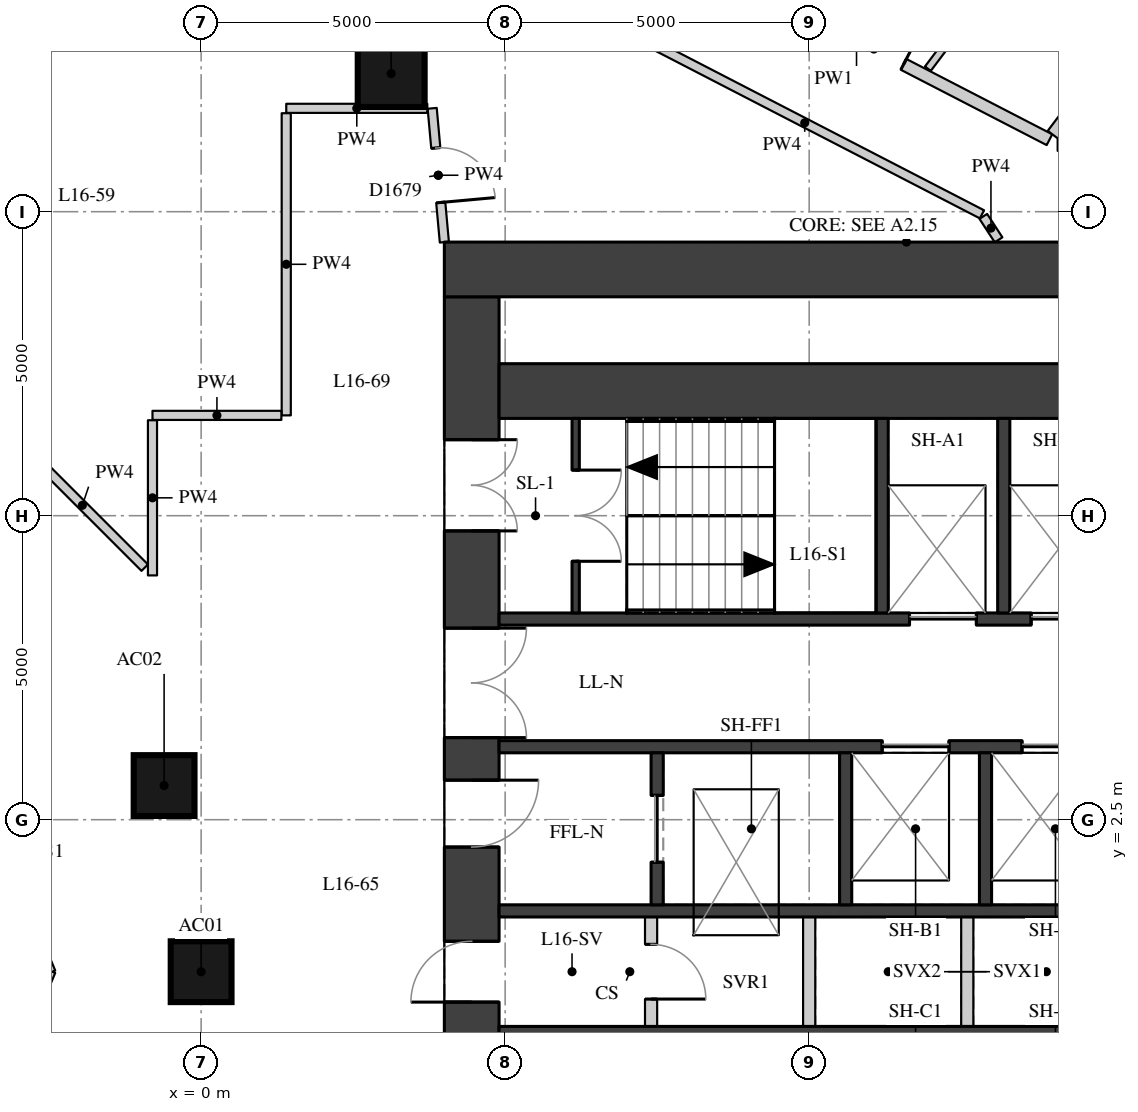
"""IFC4 building model, lengths in metres.
Left out: names, types, materials, properties, quantities, classifications, styles, units other than length and angle.
Written with IfcOpenShell. Run it as: python <this file> out.ifc"""

import sys

from ifc_helpers import new_model, si_unit, direction, frame, frame_2d, origin, origin_2d, place, context, subcontext, project, spatial, rectangle, extrude, element, fill, save


model = new_model("IFC4")
c1 = context("Model", 3, precision=1e-05, world=origin(), true_north=direction((0.0, 1.0)))
c2 = subcontext(c1, "Body", "Model", "MODEL_VIEW")
j1 = project(units=[si_unit("LENGTHUNIT", "METRE"), si_unit("PLANEANGLEUNIT", "RADIAN")], contexts=[c1])
p1 = place(None, origin())
s1 = spatial("IfcSite", under=j1, at=p1, CompositionType="ELEMENT")
p2 = place(p1, origin())
s2 = spatial("IfcBuilding", under=s1, at=p2, CompositionType="ELEMENT")
p3 = place(p2, frame((0.0, 0.0, 61.3)))
s3 = spatial("IfcBuildingStorey", under=s2, at=p3, CompositionType="ELEMENT", Elevation=61.3)
for number, where, z_axis, x_axis in (
    (1, (0.0, 0.0, 0.0), (0.0, 0.0, 1.0), (1.0, 0.0, 0.0)),
    (2, (-0.609, 3.062, 0.0), (0.0, 0.0, 1.0), (1.0, 0.0, 0.0)),
):
    element("IfcColumn", number, at=place(p3, frame(where, z_axis=z_axis, x_axis=x_axis)), inside=s3, PredefinedType="COLUMN", context=c2, shape_type="SweptSolid", body=[
        extrude(rectangle(XDim=1.0, YDim=1.0, at=origin_2d()), origin(), (0.0, 0.0, 1.0), 3.3),
    ])
p4 = place(p3, frame((3.126, 14.772, 0.0), z_axis=(0.0, 0.0, 1.0), x_axis=(1.0, 0.0, 0.0)))
e3 = element("IfcColumn", 3, at=p4, inside=s3, PredefinedType="COLUMN", context=c2, shape_type="SweptSolid", body=[
    extrude(rectangle(XDim=1.1, YDim=1.1, at=origin_2d()), origin(), (0.0, 0.0, 1.0), 3.3),
])
p5 = place(p3, frame((4.45, -11.1, 0.0), z_axis=(0.0, 0.0, 1.0), x_axis=(0.0, 1.0, 0.0)))
e4 = element("IfcWall", 4, at=p5, inside=s3, PredefinedType="SHEAR", context=c2, shape_type="SweptSolid", body=[
    extrude(rectangle(XDim=22.2, YDim=0.9, at=frame_2d((11.1, 0.0))), origin(), (0.0, 0.0, 1.0), 3.02),
])
p6 = place(p5, frame((2.35, 0.0, 0.0)))
e5 = element("IfcOpeningElement", 5, at=p6, cuts=e4, PredefinedType="OPENING", context=c2, shape_type="SweptSolid", body=[
    extrude(rectangle(XDim=1.5, YDim=2.1, at=frame_2d((0.75, 1.05))), frame((0.0, 0.46, 0.0), z_axis=(0.0, -1.0, 0.0), x_axis=(1.0, 0.0, 0.0)), (0.0, 0.0, 1.0), 0.92),
])
p7 = place(p5, frame((5.45, 0.0, 0.0)))
e6 = element("IfcOpeningElement", 6, at=p7, cuts=e4, PredefinedType="OPENING", context=c2, shape_type="SweptSolid", body=[
    extrude(rectangle(XDim=1.8, YDim=2.1, at=frame_2d((0.9, 1.05))), frame((0.0, 0.46, 0.0), z_axis=(0.0, -1.0, 0.0), x_axis=(1.0, 0.0, 0.0)), (0.0, 0.0, 1.0), 0.92),
])
p8 = place(p5, frame((7.95, 0.0, 0.0)))
e7 = element("IfcOpeningElement", 7, at=p8, cuts=e4, PredefinedType="OPENING", context=c2, shape_type="SweptSolid", body=[
    extrude(rectangle(XDim=1.1, YDim=2.1, at=frame_2d((0.55, 1.05))), frame((0.0, 0.46, 0.0), z_axis=(0.0, -1.0, 0.0), x_axis=(1.0, 0.0, 0.0)), (0.0, 0.0, 1.0), 0.92),
])
p9 = place(p5, frame((10.6, 0.0, 0.0)))
e8 = element("IfcOpeningElement", 8, at=p9, cuts=e4, PredefinedType="OPENING", context=c2, shape_type="SweptSolid", body=[
    extrude(rectangle(XDim=1.0, YDim=2.1, at=frame_2d((0.5, 1.05))), frame((0.0, 0.46, 0.0), z_axis=(0.0, -1.0, 0.0), x_axis=(1.0, 0.0, 0.0)), (0.0, 0.0, 1.0), 0.92),
])
p10 = place(p5, frame((13.15, 0.0, 0.0)))
e9 = element("IfcOpeningElement", 9, at=p10, cuts=e4, PredefinedType="OPENING", context=c2, shape_type="SweptSolid", body=[
    extrude(rectangle(XDim=1.1, YDim=2.1, at=frame_2d((0.55, 1.05))), frame((0.0, 0.46, 0.0), z_axis=(0.0, -1.0, 0.0), x_axis=(1.0, 0.0, 0.0)), (0.0, 0.0, 1.0), 0.92),
])
p11 = place(p5, frame((14.95, 0.0, 0.0)))
e10 = element("IfcOpeningElement", 10, at=p11, cuts=e4, PredefinedType="OPENING", context=c2, shape_type="SweptSolid", body=[
    extrude(rectangle(XDim=1.8, YDim=2.1, at=frame_2d((0.9, 1.05))), frame((0.0, 0.46, 0.0), z_axis=(0.0, -1.0, 0.0), x_axis=(1.0, 0.0, 0.0)), (0.0, 0.0, 1.0), 0.92),
])
p12 = place(p5, frame((18.35, 0.0, 0.0)))
e11 = element("IfcOpeningElement", 11, at=p12, cuts=e4, PredefinedType="OPENING", context=c2, shape_type="SweptSolid", body=[
    extrude(rectangle(XDim=1.5, YDim=2.1, at=frame_2d((0.75, 1.05))), frame((0.0, 0.46, 0.0), z_axis=(0.0, -1.0, 0.0), x_axis=(1.0, 0.0, 0.0)), (0.0, 0.0, 1.0), 0.92),
])
p13 = place(p3, frame((4.0, 11.55, 0.0), z_axis=(0.0, 0.0, 1.0), x_axis=(1.0, 0.0, 0.0)))
e12 = element("IfcWall", 12, at=p13, inside=s3, PredefinedType="SHEAR", context=c2, shape_type="SweptSolid", body=[
    extrude(rectangle(XDim=15.2, YDim=0.9, at=frame_2d((7.6, 0.0))), origin(), (0.0, 0.0, 1.0), 3.02),
])
p14 = place(p3, frame((4.9, 9.55, 0.0), z_axis=(0.0, 0.0, 1.0), x_axis=(1.0, 0.0, 0.0)))
e13 = element("IfcWall", 13, at=p14, inside=s3, PredefinedType="SHEAR", context=c2, shape_type="SweptSolid", body=[
    extrude(rectangle(XDim=10.2, YDim=0.9, at=frame_2d((5.1, 0.0))), origin(), (0.0, 0.0, 1.0), 3.02),
])
p15 = place(p3, frame((4.9, 5.8, 0.0), z_axis=(0.0, 0.0, 1.0), x_axis=(1.0, 0.0, 0.0)))
e14 = element("IfcWall", 14, at=p15, inside=s3, PredefinedType="SHEAR", context=c2, shape_type="SweptSolid", body=[
    extrude(rectangle(XDim=10.2, YDim=0.2, at=frame_2d((5.1, 0.0))), origin(), (0.0, 0.0, 1.0), 3.02),
])
p16 = place(p15, frame((6.75, 0.0, 0.0)))
e15 = element("IfcOpeningElement", 15, at=p16, cuts=e14, PredefinedType="OPENING", context=c2, shape_type="SweptSolid", body=[
    extrude(rectangle(XDim=1.1, YDim=2.1, at=frame_2d((0.55, 1.05))), frame((0.0, 0.11, 0.0), z_axis=(0.0, -1.0, 0.0), x_axis=(1.0, 0.0, 0.0)), (0.0, 0.0, 1.0), 0.22),
])
p17 = place(p15, frame((8.75, 0.0, 0.0)))
e16 = element("IfcOpeningElement", 16, at=p17, cuts=e14, PredefinedType="OPENING", context=c2, shape_type="SweptSolid", body=[
    extrude(rectangle(XDim=1.1, YDim=2.1, at=frame_2d((0.55, 1.05))), frame((0.0, 0.11, 0.0), z_axis=(0.0, -1.0, 0.0), x_axis=(1.0, 0.0, 0.0)), (0.0, 0.0, 1.0), 0.22),
])
p18 = place(p3, frame((4.9, 3.7, 0.0), z_axis=(0.0, 0.0, 1.0), x_axis=(1.0, 0.0, 0.0)))
e17 = element("IfcWall", 17, at=p18, inside=s3, PredefinedType="SHEAR", context=c2, shape_type="SweptSolid", body=[
    extrude(rectangle(XDim=10.2, YDim=0.2, at=frame_2d((5.1, 0.0))), origin(), (0.0, 0.0, 1.0), 3.02),
])
p19 = place(p18, frame((6.3, 0.0, 0.0)))
e18 = element("IfcOpeningElement", 18, at=p19, cuts=e17, PredefinedType="OPENING", context=c2, shape_type="SweptSolid", body=[
    extrude(rectangle(XDim=1.1, YDim=2.1, at=frame_2d((0.55, 1.05))), frame((0.0, 0.11, 0.0), z_axis=(0.0, -1.0, 0.0), x_axis=(1.0, 0.0, 0.0)), (0.0, 0.0, 1.0), 0.22),
])
p20 = place(p18, frame((8.6, 0.0, 0.0)))
e19 = element("IfcOpeningElement", 19, at=p20, cuts=e17, PredefinedType="OPENING", context=c2, shape_type="SweptSolid", body=[
    extrude(rectangle(XDim=1.1, YDim=2.1, at=frame_2d((0.55, 1.05))), frame((0.0, 0.11, 0.0), z_axis=(0.0, -1.0, 0.0), x_axis=(1.0, 0.0, 0.0)), (0.0, 0.0, 1.0), 0.22),
])
for number, where, z_axis, x_axis in (
    (20, (4.9, 1.0, 0.0), (0.0, 0.0, 1.0), (1.0, 0.0, 0.0)),
    (21, (4.9, -1.0, 0.0), (0.0, 0.0, 1.0), (1.0, 0.0, 0.0)),
):
    element("IfcWall", number, at=place(p3, frame(where, z_axis=z_axis, x_axis=x_axis)), inside=s3, PredefinedType="SHEAR", context=c2, shape_type="SweptSolid", body=[
        extrude(rectangle(XDim=10.2, YDim=0.2, at=frame_2d((5.1, 0.0))), origin(), (0.0, 0.0, 1.0), 3.02),
    ])
for number, where, z_axis, x_axis in (
    (22, (11.2, 5.9, 0.0), (0.0, 0.0, 1.0), (0.0, 1.0, 0.0)),
    (23, (13.2, 5.9, 0.0), (0.0, 0.0, 1.0), (0.0, 1.0, 0.0)),
):
    element("IfcWall", number, at=place(p3, frame(where, z_axis=z_axis, x_axis=x_axis)), inside=s3, PredefinedType="SHEAR", context=c2, shape_type="SweptSolid", body=[
        extrude(rectangle(XDim=3.2, YDim=0.2, at=frame_2d((1.6, 0.0))), origin(), (0.0, 0.0, 1.0), 3.02),
    ])
p21 = place(p3, frame((7.5, 1.1, 0.0), z_axis=(0.0, 0.0, 1.0), x_axis=(0.0, 1.0, 0.0)))
e24 = element("IfcWall", 24, at=p21, inside=s3, PredefinedType="SHEAR", context=c2, shape_type="SweptSolid", body=[
    extrude(rectangle(XDim=2.5, YDim=0.2, at=frame_2d((1.25, 0.0))), origin(), (0.0, 0.0, 1.0), 3.02),
])
p22 = place(p21, frame((0.7, 0.0, 0.0)))
e25 = element("IfcOpeningElement", 25, at=p22, cuts=e24, PredefinedType="OPENING", context=c2, shape_type="SweptSolid", body=[
    extrude(rectangle(XDim=1.1, YDim=2.1, at=frame_2d((0.55, 1.05))), frame((0.0, 0.11, 0.0), z_axis=(0.0, -1.0, 0.0), x_axis=(1.0, 0.0, 0.0)), (0.0, 0.0, 1.0), 0.22),
])
for number, where, z_axis, x_axis in (
    (26, (10.6, 1.1, 0.0), (0.0, 0.0, 1.0), (0.0, 1.0, 0.0)),
    (27, (12.9, 1.1, 0.0), (0.0, 0.0, 1.0), (0.0, 1.0, 0.0)),
):
    element("IfcWall", number, at=place(p3, frame(where, z_axis=z_axis, x_axis=x_axis)), inside=s3, PredefinedType="SHEAR", context=c2, shape_type="SweptSolid", body=[
        extrude(rectangle(XDim=2.5, YDim=0.2, at=frame_2d((1.25, 0.0))), origin(), (0.0, 0.0, 1.0), 3.02),
    ])
p23 = place(p3, frame((6.16, 5.9, 0.0), z_axis=(0.0, 0.0, 1.0), x_axis=(0.0, 1.0, 0.0)))
e28 = element("IfcWall", 28, at=p23, inside=s3, PredefinedType="SHEAR", context=c2, shape_type="SweptSolid", body=[
    extrude(rectangle(XDim=3.2, YDim=0.12, at=frame_2d((1.6, 0.0))), origin(), (0.0, 0.0, 1.0), 3.02),
])
p24 = place(p23, frame((0.85, 0.0, 0.0)))
e29 = element("IfcOpeningElement", 29, at=p24, cuts=e28, PredefinedType="OPENING", context=c2, shape_type="SweptSolid", body=[
    extrude(rectangle(XDim=1.5, YDim=2.1, at=frame_2d((0.75, 1.05))), frame((0.0, 0.07, 0.0), z_axis=(0.0, -1.0, 0.0), x_axis=(1.0, 0.0, 0.0)), (0.0, 0.0, 1.0), 0.14),
])
p25 = place(p3, frame((7.4, -0.9, 0.0), z_axis=(0.0, 0.0, 1.0), x_axis=(0.0, 1.0, 0.0)))
e30 = element("IfcWall", 30, at=p25, inside=s3, PredefinedType="PARTITIONING", context=c2, shape_type="SweptSolid", body=[
    extrude(rectangle(XDim=1.8, YDim=0.2, at=frame_2d((0.9, 0.0))), origin(), (0.0, 0.0, 1.0), 3.02),
])
p26 = place(p25, frame((0.45, 0.0, 0.0)))
e31 = element("IfcOpeningElement", 31, at=p26, cuts=e30, PredefinedType="OPENING", context=c2, shape_type="SweptSolid", body=[
    extrude(rectangle(XDim=0.9, YDim=2.1, at=frame_2d((0.45, 1.05))), frame((0.0, 0.11, 0.0), z_axis=(0.0, -1.0, 0.0), x_axis=(1.0, 0.0, 0.0)), (0.0, 0.0, 1.0), 0.22),
])
for number, where, z_axis, x_axis in (
    (32, (10.0, -0.9, 0.0), (0.0, 0.0, 1.0), (0.0, 1.0, 0.0)),
    (33, (12.6, -0.9, 0.0), (0.0, 0.0, 1.0), (0.0, 1.0, 0.0)),
):
    element("IfcWall", number, at=place(p3, frame(where, z_axis=z_axis, x_axis=x_axis)), inside=s3, PredefinedType="PARTITIONING", context=c2, shape_type="SweptSolid", body=[
        extrude(rectangle(XDim=1.8, YDim=0.2, at=frame_2d((0.9, 0.0))), origin(), (0.0, 0.0, 1.0), 3.02),
    ])
p27 = place(p3, frame((7.606, 16.961, 0.0), z_axis=(0.0, 0.0, 1.0), x_axis=(0.888519518851, -0.45883882205, 0.0)))
e34 = element("IfcWall", 34, at=p27, inside=s3, PredefinedType="PARTITIONING", context=c2, shape_type="SweptSolid", body=[
    extrude(rectangle(XDim=7.142, YDim=0.2, at=frame_2d((3.571, 0.0))), origin(), (0.0, 0.0, 1.0), 3.02),
])
p28 = place(p27, frame((3.342, 0.0, 0.0)))
e35 = element("IfcOpeningElement", 35, at=p28, cuts=e34, PredefinedType="OPENING", context=c2, shape_type="SweptSolid", body=[
    extrude(rectangle(XDim=1.1, YDim=2.1, at=frame_2d((0.55, 1.05))), frame((0.0, 0.11, 0.0), z_axis=(0.0, -1.0, 0.0), x_axis=(1.0, 0.0, 0.0)), (0.0, 0.0, 1.0), 0.22),
])
p29 = place(p3, frame((14.086, 13.6, 0.0), z_axis=(0.0, 0.0, 1.0), x_axis=(1.0, 0.0, 0.0)))
e36 = element("IfcWall", 36, at=p29, inside=s3, PredefinedType="PARTITIONING", context=c2, shape_type="SweptSolid", body=[
    extrude(rectangle(XDim=6.614, YDim=0.2, at=frame_2d((3.307, 0.0))), origin(), (0.0, 0.0, 1.0), 3.02),
])
p30 = place(p29, frame((2.303, 0.0, 0.0)))
e37 = element("IfcOpeningElement", 37, at=p30, cuts=e36, PredefinedType="OPENING", context=c2, shape_type="SweptSolid", body=[
    extrude(rectangle(XDim=1.8, YDim=2.1, at=frame_2d((0.9, 1.05))), frame((0.0, 0.11, 0.0), z_axis=(0.0, -1.0, 0.0), x_axis=(1.0, 0.0, 0.0)), (0.0, 0.0, 1.0), 0.22),
])
p31 = place(p3, frame((4.0, 11.999, 0.0), z_axis=(0.0, 0.0, 1.0), x_axis=(-0.090475982725, 0.995898637689, 0.0)))
e38 = element("IfcWall", 38, at=p31, inside=s3, PredefinedType="PARTITIONING", context=c2, shape_type="SweptSolid", body=[
    extrude(rectangle(XDim=2.21, YDim=0.15, at=frame_2d((1.105, 0.0))), origin(), (0.0, 0.0, 1.0), 3.02),
])
p32 = place(p31, frame((0.655, 0.0, 0.0)))
e39 = element("IfcOpeningElement", 39, at=p32, cuts=e38, PredefinedType="OPENING", context=c2, shape_type="SweptSolid", body=[
    extrude(rectangle(XDim=0.9, YDim=2.1, at=frame_2d((0.45, 1.05))), frame((0.0, 0.085, 0.0), z_axis=(0.0, -1.0, 0.0), x_axis=(1.0, 0.0, 0.0)), (0.0, 0.0, 1.0), 0.17),
])
p33 = place(p3, frame((3.72, 14.2, 0.0), z_axis=(0.0, 0.0, 1.0), x_axis=(-1.0, 0.0, 0.0)))
e40 = element("IfcWall", 40, at=p33, inside=s3, PredefinedType="PARTITIONING", context=c2, shape_type="SweptSolid", body=[
    extrude(rectangle(XDim=2.32, YDim=0.15, at=frame_2d((1.16, 0.0))), origin(), (0.0, 0.0, 1.0), 3.02),
])
p34 = place(p3, frame((1.4, 14.12, 0.0), z_axis=(0.0, 0.0, 1.0), x_axis=(0.0, -1.0, 0.0)))
e41 = element("IfcWall", 41, at=p34, inside=s3, PredefinedType="PARTITIONING", context=c2, shape_type="SweptSolid", body=[
    extrude(rectangle(XDim=4.97, YDim=0.15, at=frame_2d((2.485, 0.0))), origin(), (0.0, 0.0, 1.0), 3.02),
])
p35 = place(p3, frame((1.32, 9.15, 0.0), z_axis=(0.0, 0.0, 1.0), x_axis=(-1.0, 0.0, 0.0)))
e42 = element("IfcWall", 42, at=p35, inside=s3, PredefinedType="PARTITIONING", context=c2, shape_type="SweptSolid", body=[
    extrude(rectangle(XDim=2.12, YDim=0.15, at=frame_2d((1.06, 0.0))), origin(), (0.0, 0.0, 1.0), 3.02),
])
p36 = place(p3, frame((-0.8, 9.07, 0.0), z_axis=(0.0, 0.0, 1.0), x_axis=(0.0, -1.0, 0.0)))
e43 = element("IfcWall", 43, at=p36, inside=s3, PredefinedType="PARTITIONING", context=c2, shape_type="SweptSolid", body=[
    extrude(rectangle(XDim=2.552, YDim=0.15, at=frame_2d((1.276, 0.0))), origin(), (0.0, 0.0, 1.0), 3.02),
])
p37 = place(p3, frame((-0.927, 6.645, 0.0), z_axis=(0.0, 0.0, 1.0), x_axis=(-0.707106781187, 0.707106781187, 0.0)))
e44 = element("IfcWall", 44, at=p37, inside=s3, PredefinedType="PARTITIONING", context=c2, shape_type="SweptSolid", body=[
    extrude(rectangle(XDim=2.901, YDim=0.15, at=frame_2d((1.451, 0.0))), origin(), (0.0, 0.0, 1.0), 3.02),
])
p38 = place(p3, frame((-7.022, 14.875, 0.0), z_axis=(0.0, 0.0, 1.0), x_axis=(0.972565872543, 0.232627650043, 0.0)))
e45 = element("IfcWall", 45, at=p38, inside=s3, PredefinedType="PARTITIONING", context=c2, shape_type="SweptSolid", body=[
    extrude(rectangle(XDim=7.286, YDim=0.15, at=frame_2d((3.643, 0.0))), origin(), (0.0, 0.0, 1.0), 3.02),
])
p39 = place(p3, frame((7.012, 15.467, 0.0), z_axis=(0.0, 0.0, 1.0), x_axis=(0.888509096081, -0.458859004685, 0.0)))
e46 = element("IfcWall", 46, at=p39, inside=s3, PredefinedType="PARTITIONING", context=c2, shape_type="SweptSolid", body=[
    extrude(rectangle(XDim=6.561, YDim=0.15, at=frame_2d((3.281, 0.0))), origin(), (0.0, 0.0, 1.0), 3.02),
])
p40 = place(p3, frame((12.864, 12.423, 0.0), z_axis=(0.0, 0.0, 1.0), x_axis=(0.545733799108, -0.837958603101, 0.0)))
e47 = element("IfcWall", 47, at=p40, inside=s3, PredefinedType="PARTITIONING", context=c2, shape_type="SweptSolid", body=[
    extrude(rectangle(XDim=0.46, YDim=0.15, at=frame_2d((0.23, 0.0))), origin(), (0.0, 0.0, 1.0), 3.02),
])
p41 = place(p3, frame((16.927, 17.638, 0.0), z_axis=(0.0, 0.0, 1.0), x_axis=(-0.601159395391, -0.799129139334, 0.0)))
e48 = element("IfcWall", 48, at=p41, inside=s3, PredefinedType="PARTITIONING", context=c2, shape_type="SweptSolid", body=[
    extrude(rectangle(XDim=4.849, YDim=0.22, at=frame_2d((2.425, 0.0))), origin(), (0.0, 0.0, 1.0), 3.02),
])
p42 = place(p3, frame((11.952, 14.852, 0.0), z_axis=(0.0, 0.0, 1.0), x_axis=(0.60115003842, 0.7991361782, 0.0)))
e49 = element("IfcWall", 49, at=p42, inside=s3, PredefinedType="PARTITIONING", context=c2, shape_type="SweptSolid", body=[
    extrude(rectangle(XDim=2.818, YDim=0.12, at=frame_2d((1.409, 0.0))), origin(), (0.0, 0.0, 1.0), 3.02),
])
for number, where, z_axis, x_axis in (
    (50, (-2.446, 0.0, 0.0), (0.0, 0.0, 1.0), (-0.383, -0.924, 0.0)),
    (51, (-4.073, 3.927, 0.0), (0.0, 0.0, 1.0), (0.383, -0.924, 0.0)),
):
    element("IfcWall", number, at=place(p3, frame(where, z_axis=z_axis, x_axis=x_axis)), inside=s3, PredefinedType="PARTITIONING", context=c2, shape_type="SweptSolid", body=[
        extrude(rectangle(XDim=4.251, YDim=0.1, at=frame_2d((2.125, 0.0))), origin(), (0.0, 0.0, 1.0), 3.02),
    ])
p43 = place(p9, origin())
e52 = element("IfcDoor", 52, at=p43, inside=s3, OperationType="SINGLE_SWING_LEFT", PredefinedType="DOOR", context=c2, shape_type="SweptSolid", body=[
    extrude(rectangle(XDim=1.0, YDim=2.1, at=frame_2d((0.5, 1.05))), frame((0.0, 0.025, 0.0), z_axis=(0.0, -1.0, 0.0), x_axis=(1.0, 0.0, 0.0)), (0.0, 0.0, 1.0), 0.05),
])
fill(e8, e52)
p44 = place(p10, origin())
e53 = element("IfcDoor", 53, at=p44, inside=s3, OperationType="SINGLE_SWING_LEFT", PredefinedType="DOOR", context=c2, shape_type="SweptSolid", body=[
    extrude(rectangle(XDim=1.1, YDim=2.1, at=frame_2d((0.55, 1.05))), frame((0.0, 0.025, 0.0), z_axis=(0.0, -1.0, 0.0), x_axis=(1.0, 0.0, 0.0)), (0.0, 0.0, 1.0), 0.05),
])
fill(e9, e53)
p45 = place(p11, origin())
e54 = element("IfcDoor", 54, at=p45, inside=s3, OperationType="DOUBLE_DOOR_SINGLE_SWING", PredefinedType="DOOR", context=c2, shape_type="SweptSolid", body=[
    extrude(rectangle(XDim=1.8, YDim=2.1, at=frame_2d((0.9, 1.05))), frame((0.0, 0.025, 0.0), z_axis=(0.0, -1.0, 0.0), x_axis=(1.0, 0.0, 0.0)), (0.0, 0.0, 1.0), 0.05),
])
fill(e10, e54)
p46 = place(p12, origin())
e55 = element("IfcDoor", 55, at=p46, inside=s3, OperationType="DOUBLE_DOOR_SINGLE_SWING", PredefinedType="DOOR", context=c2, shape_type="SweptSolid", body=[
    extrude(rectangle(XDim=1.5, YDim=2.1, at=frame_2d((0.75, 1.05))), frame((0.0, 0.025, 0.0), z_axis=(0.0, -1.0, 0.0), x_axis=(1.0, 0.0, 0.0)), (0.0, 0.0, 1.0), 0.05),
])
fill(e11, e55)
p47 = place(p24, origin())
e56 = element("IfcDoor", 56, at=p47, inside=s3, OperationType="DOUBLE_DOOR_SINGLE_SWING", PredefinedType="DOOR", context=c2, shape_type="SweptSolid", body=[
    extrude(rectangle(XDim=1.5, YDim=2.1, at=frame_2d((0.75, 1.05))), frame((0.0, 0.025, 0.0), z_axis=(0.0, -1.0, 0.0), x_axis=(1.0, 0.0, 0.0)), (0.0, 0.0, 1.0), 0.05),
])
fill(e29, e56)
p48 = place(p16, origin())
e57 = element("IfcDoor", 57, at=p48, inside=s3, OperationType="DOUBLE_DOOR_SLIDING", PredefinedType="DOOR", context=c2, shape_type="SweptSolid", body=[
    extrude(rectangle(XDim=1.1, YDim=2.1, at=frame_2d((0.55, 1.05))), frame((0.0, 0.025, 0.0), z_axis=(0.0, -1.0, 0.0), x_axis=(1.0, 0.0, 0.0)), (0.0, 0.0, 1.0), 0.05),
])
fill(e15, e57)
p49 = place(p17, origin())
e58 = element("IfcDoor", 58, at=p49, inside=s3, OperationType="DOUBLE_DOOR_SLIDING", PredefinedType="DOOR", context=c2, shape_type="SweptSolid", body=[
    extrude(rectangle(XDim=1.1, YDim=2.1, at=frame_2d((0.55, 1.05))), frame((0.0, 0.025, 0.0), z_axis=(0.0, -1.0, 0.0), x_axis=(1.0, 0.0, 0.0)), (0.0, 0.0, 1.0), 0.05),
])
fill(e16, e58)
p50 = place(p19, origin())
e59 = element("IfcDoor", 59, at=p50, inside=s3, OperationType="DOUBLE_DOOR_SLIDING", PredefinedType="DOOR", context=c2, shape_type="SweptSolid", body=[
    extrude(rectangle(XDim=1.1, YDim=2.1, at=frame_2d((0.55, 1.05))), frame((0.0, 0.025, 0.0), z_axis=(0.0, -1.0, 0.0), x_axis=(1.0, 0.0, 0.0)), (0.0, 0.0, 1.0), 0.05),
])
fill(e18, e59)
p51 = place(p20, origin())
e60 = element("IfcDoor", 60, at=p51, inside=s3, OperationType="DOUBLE_DOOR_SLIDING", PredefinedType="DOOR", context=c2, shape_type="SweptSolid", body=[
    extrude(rectangle(XDim=1.1, YDim=2.1, at=frame_2d((0.55, 1.05))), frame((0.0, 0.025, 0.0), z_axis=(0.0, -1.0, 0.0), x_axis=(1.0, 0.0, 0.0)), (0.0, 0.0, 1.0), 0.05),
])
fill(e19, e60)
p52 = place(p22, origin())
e61 = element("IfcDoor", 61, at=p52, inside=s3, OperationType="DOUBLE_DOOR_SLIDING", PredefinedType="DOOR", context=c2, shape_type="SweptSolid", body=[
    extrude(rectangle(XDim=1.1, YDim=2.1, at=frame_2d((0.55, 1.05))), frame((0.0, 0.025, 0.0), z_axis=(0.0, -1.0, 0.0), x_axis=(1.0, 0.0, 0.0)), (0.0, 0.0, 1.0), 0.05),
])
fill(e25, e61)
p53 = place(p26, origin())
e62 = element("IfcDoor", 62, at=p53, inside=s3, OperationType="SINGLE_SWING_RIGHT", PredefinedType="DOOR", context=c2, shape_type="SweptSolid", body=[
    extrude(rectangle(XDim=0.9, YDim=2.1, at=frame_2d((0.45, 1.05))), frame((0.0, 0.025, 0.0), z_axis=(0.0, -1.0, 0.0), x_axis=(1.0, 0.0, 0.0)), (0.0, 0.0, 1.0), 0.05),
])
fill(e31, e62)
p54 = place(p28, origin())
e63 = element("IfcDoor", 63, at=p54, inside=s3, OperationType="SINGLE_SWING_RIGHT", PredefinedType="DOOR", context=c2, shape_type="SweptSolid", body=[
    extrude(rectangle(XDim=1.1, YDim=2.1, at=frame_2d((0.55, 1.05))), frame((0.0, 0.025, 0.0), z_axis=(0.0, -1.0, 0.0), x_axis=(1.0, 0.0, 0.0)), (0.0, 0.0, 1.0), 0.05),
])
fill(e35, e63)
p55 = place(p32, origin())
e64 = element("IfcDoor", 64, at=p55, inside=s3, OperationType="SINGLE_SWING_RIGHT", PredefinedType="DOOR", context=c2, shape_type="SweptSolid", body=[
    extrude(rectangle(XDim=0.9, YDim=2.1, at=frame_2d((0.45, 1.05))), frame((0.0, 0.025, 0.0), z_axis=(0.0, -1.0, 0.0), x_axis=(1.0, 0.0, 0.0)), (0.0, 0.0, 1.0), 0.05),
])
fill(e39, e64)
save(model, sys.argv[1])
